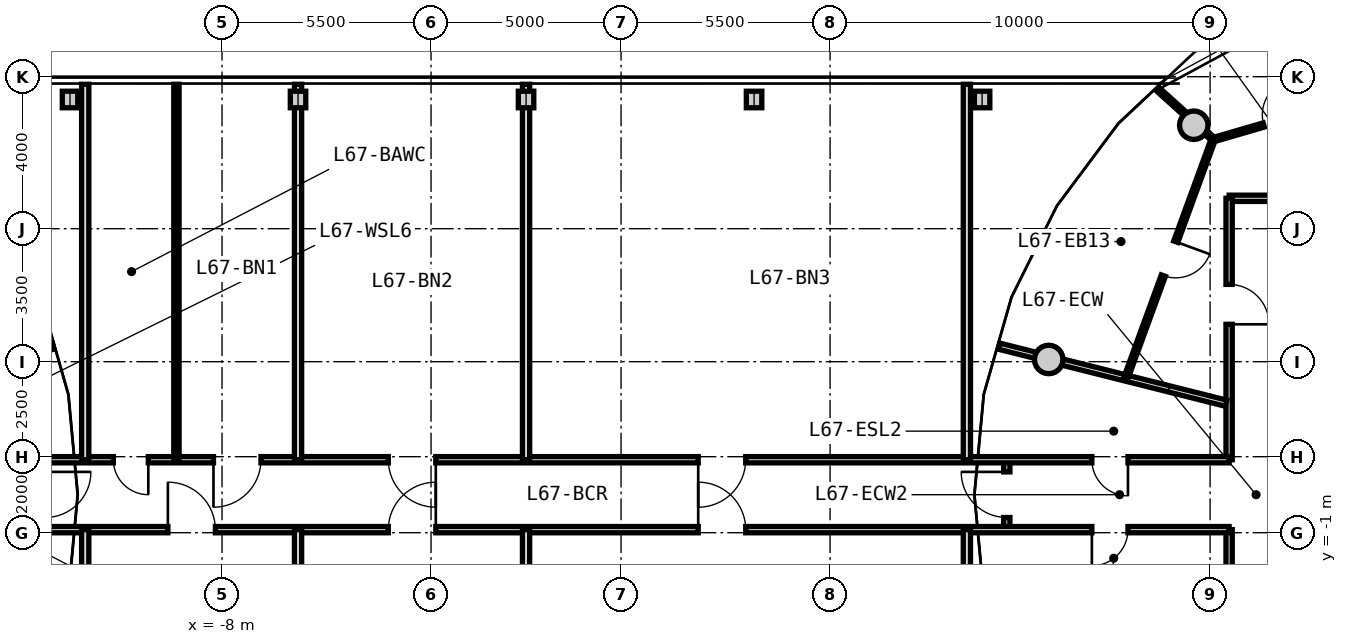
"""IFC4 building model, lengths in metres.
Left out: names, types, materials, properties, quantities, classifications, styles, units other than length and angle.
Written with IfcOpenShell. Run it as: python <this file> out.ifc"""

import sys

from ifc_helpers import new_model, si_unit, direction, frame, frame_2d, origin, origin_2d, place, context, subcontext, project, spatial, rectangle, circle, i_section, extrude, source, transform, mapped, element, fill, save


model = new_model("IFC4")
c1 = context("Model", 3, precision=1e-05, world=origin(), true_north=direction((0.0, 1.0)))
c2 = subcontext(c1, "Body", "Model", "MODEL_VIEW")
j1 = project(units=[si_unit("LENGTHUNIT", "METRE"), si_unit("PLANEANGLEUNIT", "RADIAN")], contexts=[c1])
p1 = place(None, origin())
s1 = spatial("IfcSite", under=j1, at=p1, CompositionType="ELEMENT")
p2 = place(p1, origin())
s2 = spatial("IfcBuilding", under=s1, at=p2, CompositionType="ELEMENT")
p3 = place(p2, frame((0.0, 0.0, 216.95)))
s3 = spatial("IfcBuildingStorey", under=s2, at=p3, CompositionType="ELEMENT", Elevation=216.95)
m1 = source(origin(), c2, "Body", "SweptSolid", [
    extrude(circle(Radius=0.375, at=origin_2d()), origin(), (0.0, 0.0, 1.0), 3.05),
])
for number, where, z_axis, x_axis in (
    (1, (17.57, 9.723, 0.0), (0.0, 0.0, 1.0), (1.0, 0.0, 0.0)),
    (2, (13.753, 3.559, 0.0), (0.0, 0.0, 1.0), (1.0, 0.0, 0.0)),
):
    element("IfcColumn", number, at=place(p3, frame(where, z_axis=z_axis, x_axis=x_axis)), inside=s3, PredefinedType="COLUMN", context=c2, shape_type="MappedRepresentation", body=[
        mapped(m1, transform((0.0, 0.0, 0.0), x_axis=(1.0, 0.0, 0.0), y_axis=(0.0, 1.0, 0.0), z_axis=(0.0, 0.0, 1.0), scale=1.0)),
    ])
m2 = source(origin(), c2, "Body", "SweptSolid", [
    extrude(i_section(OverallWidth=0.407, OverallDepth=0.435, WebThickness=0.024, FlangeThickness=0.039, FilletRadius=0.015, at=origin_2d()), origin(), (0.0, 0.0, 1.0), 3.05),
])
for number, where, z_axis, x_axis in (
    (3, (-12.0, 10.4, 0.0), (0.0, 0.0, 1.0), (1.0, 0.0, 0.0)),
    (4, (-6.0, 10.4, 0.0), (0.0, 0.0, 1.0), (1.0, 0.0, 0.0)),
    (5, (0.0, 10.4, 0.0), (0.0, 0.0, 1.0), (1.0, 0.0, 0.0)),
    (6, (6.0, 10.4, 0.0), (0.0, 0.0, 1.0), (1.0, 0.0, 0.0)),
    (7, (12.0, 10.4, 0.0), (0.0, 0.0, 1.0), (1.0, 0.0, 0.0)),
):
    element("IfcColumn", number, at=place(p3, frame(where, z_axis=z_axis, x_axis=x_axis)), inside=s3, PredefinedType="COLUMN", context=c2, shape_type="MappedRepresentation", body=[
        mapped(m2, transform((0.0, 0.0, 0.0), x_axis=(1.0, 0.0, 0.0), y_axis=(0.0, 1.0, 0.0), z_axis=(0.0, 0.0, 1.0), scale=1.0)),
    ])
m3 = source(origin(), c2, "Body", "SweptSolid", [
    extrude(rectangle(XDim=6.157, YDim=0.165, at=frame_2d((3.079, 0.0))), origin(), (0.0, 0.0, 1.0), 2.345),
])
p4 = place(p3, frame((-18.42, 2.407, 0.0), z_axis=(0.0, 0.0, 1.0), x_axis=(0.969840867184, 0.243738984038, 0.0)))
e8 = element("IfcWall", 8, at=p4, inside=s3, PredefinedType="PARTITIONING", context=c2, shape_type="MappedRepresentation", body=[
    mapped(m3, transform((0.0, 0.0, 0.0), x_axis=(1.0, 0.0, 0.0), y_axis=(0.0, 1.0, 0.0), z_axis=(0.0, 0.0, 1.0), scale=1.0)),
])
m4 = source(origin(), c2, "Body", "SweptSolid", [
    extrude(rectangle(XDim=8.58, YDim=0.165, at=frame_2d((4.29, 0.0))), origin(), (0.0, 0.0, 1.0), 2.745),
])
p5 = place(p3, frame((18.5, 7.8, 0.0), z_axis=(0.0, 0.0, 1.0), x_axis=(1.0, 0.0, 0.0)))
e9 = element("IfcWall", 9, at=p5, inside=s3, PredefinedType="PARTITIONING", context=c2, shape_type="MappedRepresentation", body=[
    mapped(m4, transform((0.0, 0.0, 0.0), x_axis=(1.0, 0.0, 0.0), y_axis=(0.0, 1.0, 0.0), z_axis=(0.0, 0.0, 1.0), scale=1.0)),
])
m5 = source(origin(), c2, "Body", "SweptSolid", [
    extrude(rectangle(XDim=6.88, YDim=0.165, at=frame_2d((3.44, 0.0))), origin(), (0.0, 0.0, 1.0), 2.745),
])
p6 = place(p3, frame((18.5, -7.8, 0.0), z_axis=(0.0, 0.0, 1.0), x_axis=(0.0, 1.0, 0.0)))
e10 = element("IfcWall", 10, at=p6, inside=s3, PredefinedType="PARTITIONING", context=c2, shape_type="MappedRepresentation", body=[
    mapped(m5, transform((0.0, 0.0, 0.0), x_axis=(1.0, 0.0, 0.0), y_axis=(0.0, 1.0, 0.0), z_axis=(0.0, 0.0, 1.0), scale=1.0)),
])
p7 = place(p3, frame((18.5, 0.92, 0.0), z_axis=(0.0, 0.0, 1.0), x_axis=(0.0, 1.0, 0.0)))
e11 = element("IfcWall", 11, at=p7, inside=s3, PredefinedType="PARTITIONING", context=c2, shape_type="MappedRepresentation", body=[
    mapped(m5, transform((0.0, 0.0, 0.0), x_axis=(1.0, 0.0, 0.0), y_axis=(0.0, 1.0, 0.0), z_axis=(0.0, 0.0, 1.0), scale=1.0)),
])
p8 = place(p7, frame((3.564, 0.0, 0.0)))
e12 = element("IfcOpeningElement", 12, at=p8, cuts=e11, PredefinedType="OPENING", context=c2, shape_type="SweptSolid", body=[
    extrude(rectangle(XDim=1.05, YDim=2.15, at=frame_2d((0.525, 1.075))), frame((0.0, 0.093, 0.0), z_axis=(0.0, -1.0, 0.0), x_axis=(1.0, 0.0, 0.0)), (0.0, 0.0, 1.0), 0.185),
])
p9 = place(p3, frame((18.42, 2.407, 0.0), z_axis=(0.0, 0.0, 1.0), x_axis=(-0.969840867184, 0.243738984038, 0.0)))
e13 = element("IfcWall", 13, at=p9, inside=s3, PredefinedType="PARTITIONING", context=c2, shape_type="MappedRepresentation", body=[
    mapped(m3, transform((0.0, 0.0, 0.0), x_axis=(1.0, 0.0, 0.0), y_axis=(0.0, 1.0, 0.0), z_axis=(0.0, 0.0, 1.0), scale=1.0)),
])
m6 = source(origin(), c2, "Body", "SweptSolid", [
    extrude(rectangle(XDim=6.69, YDim=0.115, at=frame_2d((3.345, 0.0))), origin(), (0.0, 0.0, 1.0), 2.745),
])
p10 = place(p3, frame((18.083, 9.352, 0.0), z_axis=(0.0, 0.0, 1.0), x_axis=(-0.343693784919, -0.939081776102, 0.0)))
e14 = element("IfcWall", 14, at=p10, inside=s3, PredefinedType="PARTITIONING", context=c2, shape_type="MappedRepresentation", body=[
    mapped(m6, transform((0.0, 0.0, 0.0), x_axis=(1.0, 0.0, 0.0), y_axis=(0.0, 1.0, 0.0), z_axis=(0.0, 0.0, 1.0), scale=1.0)),
])
p11 = place(p10, frame((2.87, 0.0, 0.0)))
e15 = element("IfcOpeningElement", 15, at=p11, cuts=e14, PredefinedType="OPENING", context=c2, shape_type="SweptSolid", body=[
    extrude(rectangle(XDim=0.95, YDim=2.1, at=frame_2d((0.475, 1.05))), frame((0.0, 0.067, 0.0), z_axis=(0.0, -1.0, 0.0), x_axis=(1.0, 0.0, 0.0)), (0.0, 0.0, 1.0), 0.135),
])
m7 = source(origin(), c2, "Body", "SweptSolid", [
    extrude(rectangle(XDim=1.977, YDim=0.115, at=frame_2d((0.989, 0.0))), origin(), (0.0, 0.0, 1.0), 2.345),
])
p12 = place(p3, frame((18.083, 9.352, 0.0), z_axis=(0.0, 0.0, 1.0), x_axis=(-0.742064998629, 0.670327933037, 0.0)))
e16 = element("IfcWall", 16, at=p12, inside=s3, PredefinedType="PARTITIONING", context=c2, shape_type="MappedRepresentation", body=[
    mapped(m7, transform((0.0, 0.0, 0.0), x_axis=(1.0, 0.0, 0.0), y_axis=(0.0, 1.0, 0.0), z_axis=(0.0, 0.0, 1.0), scale=1.0)),
])
m8 = source(origin(), c2, "Body", "SweptSolid", [
    extrude(rectangle(XDim=3.702, YDim=0.115, at=frame_2d((1.851, 0.0))), origin(), (0.0, 0.0, 1.0), 2.745),
])
p13 = place(p3, frame((21.645, 10.38, 0.0), z_axis=(0.0, 0.0, 1.0), x_axis=(-0.960044309887, -0.279848035645, 0.0)))
e17 = element("IfcWall", 17, at=p13, inside=s3, PredefinedType="PARTITIONING", context=c2, shape_type="MappedRepresentation", body=[
    mapped(m8, transform((0.0, 0.0, 0.0), x_axis=(1.0, 0.0, 0.0), y_axis=(0.0, 1.0, 0.0), z_axis=(0.0, 0.0, 1.0), scale=1.0)),
])
p14 = place(p13, frame((1.376, 0.0, 0.0)))
e18 = element("IfcOpeningElement", 18, at=p14, cuts=e17, PredefinedType="OPENING", context=c2, shape_type="SweptSolid", body=[
    extrude(rectangle(XDim=0.95, YDim=2.1, at=frame_2d((0.475, 1.05))), frame((0.0, 0.067, 0.0), z_axis=(0.0, -1.0, 0.0), x_axis=(1.0, 0.0, 0.0)), (0.0, 0.0, 1.0), 0.135),
])
m9 = source(origin(), c2, "Body", "SweptSolid", [
    extrude(rectangle(XDim=1.84, YDim=0.165, at=frame_2d((0.92, 0.0))), origin(), (0.0, 0.0, 1.0), 2.745),
])
p15 = place(p3, frame((12.65, -0.92, 0.0), z_axis=(0.0, 0.0, 1.0), x_axis=(0.0, 1.0, 0.0)))
e19 = element("IfcWall", 19, at=p15, inside=s3, PredefinedType="PARTITIONING", context=c2, shape_type="MappedRepresentation", body=[
    mapped(m9, transform((0.0, 0.0, 0.0), x_axis=(1.0, 0.0, 0.0), y_axis=(0.0, 1.0, 0.0), z_axis=(0.0, 0.0, 1.0), scale=1.0)),
])
p16 = place(p15, frame((0.32, 0.0, 0.0)))
e20 = element("IfcOpeningElement", 20, at=p16, cuts=e19, PredefinedType="OPENING", context=c2, shape_type="SweptSolid", body=[
    extrude(rectangle(XDim=1.2, YDim=2.15, at=frame_2d((0.6, 1.075))), frame((0.0, 0.093, 0.0), z_axis=(0.0, -1.0, 0.0), x_axis=(1.0, 0.0, 0.0)), (0.0, 0.0, 1.0), 0.185),
])
m10 = source(origin(), c2, "Body", "SweptSolid", [
    extrude(rectangle(XDim=37.0, YDim=0.165, at=frame_2d((18.5, 0.0))), origin(), (0.0, 0.0, 1.0), 2.745),
])
p17 = place(p3, frame((-18.5, -0.92, 0.0), z_axis=(0.0, 0.0, 1.0), x_axis=(1.0, 0.0, 0.0)))
e21 = element("IfcWall", 21, at=p17, inside=s3, PredefinedType="PARTITIONING", context=c2, shape_type="MappedRepresentation", body=[
    mapped(m10, transform((0.0, 0.0, 0.0), x_axis=(1.0, 0.0, 0.0), y_axis=(0.0, 1.0, 0.0), z_axis=(0.0, 0.0, 1.0), scale=1.0)),
])
p18 = place(p17, frame((2.662, 0.0, 0.0)))
e22 = element("IfcOpeningElement", 22, at=p18, cuts=e21, PredefinedType="OPENING", context=c2, shape_type="SweptSolid", body=[
    extrude(rectangle(XDim=0.95, YDim=2.1, at=frame_2d((0.475, 1.05))), frame((0.0, 0.093, 0.0), z_axis=(0.0, -1.0, 0.0), x_axis=(1.0, 0.0, 0.0)), (0.0, 0.0, 1.0), 0.185),
])
p19 = place(p17, frame((33.388, 0.0, 0.0)))
e23 = element("IfcOpeningElement", 23, at=p19, cuts=e21, PredefinedType="OPENING", context=c2, shape_type="SweptSolid", body=[
    extrude(rectangle(XDim=0.95, YDim=2.1, at=frame_2d((0.475, 1.05))), frame((0.0, 0.093, 0.0), z_axis=(0.0, -1.0, 0.0), x_axis=(1.0, 0.0, 0.0)), (0.0, 0.0, 1.0), 0.185),
])
p20 = place(p17, frame((9.075, 0.0, 0.0)))
e24 = element("IfcOpeningElement", 24, at=p20, cuts=e21, PredefinedType="OPENING", context=c2, shape_type="SweptSolid", body=[
    extrude(rectangle(XDim=1.25, YDim=2.2, at=frame_2d((0.625, 1.1))), frame((0.0, 0.093, 0.0), z_axis=(0.0, -1.0, 0.0), x_axis=(1.0, 0.0, 0.0)), (0.0, 0.0, 1.0), 0.185),
])
p21 = place(p17, frame((14.875, 0.0, 0.0)))
e25 = element("IfcOpeningElement", 25, at=p21, cuts=e21, PredefinedType="OPENING", context=c2, shape_type="SweptSolid", body=[
    extrude(rectangle(XDim=1.25, YDim=2.2, at=frame_2d((0.625, 1.1))), frame((0.0, 0.093, 0.0), z_axis=(0.0, -1.0, 0.0), x_axis=(1.0, 0.0, 0.0)), (0.0, 0.0, 1.0), 0.185),
])
p22 = place(p17, frame((23.03, 0.0, 0.0)))
e26 = element("IfcOpeningElement", 26, at=p22, cuts=e21, PredefinedType="OPENING", context=c2, shape_type="SweptSolid", body=[
    extrude(rectangle(XDim=1.25, YDim=2.2, at=frame_2d((0.625, 1.1))), frame((0.0, 0.093, 0.0), z_axis=(0.0, -1.0, 0.0), x_axis=(1.0, 0.0, 0.0)), (0.0, 0.0, 1.0), 0.185),
])
p23 = place(p3, frame((-18.5, 0.92, 0.0), z_axis=(0.0, 0.0, 1.0), x_axis=(1.0, 0.0, 0.0)))
e27 = element("IfcWall", 27, at=p23, inside=s3, PredefinedType="PARTITIONING", context=c2, shape_type="MappedRepresentation", body=[
    mapped(m10, transform((0.0, 0.0, 0.0), x_axis=(1.0, 0.0, 0.0), y_axis=(0.0, 1.0, 0.0), z_axis=(0.0, 0.0, 1.0), scale=1.0)),
])
p24 = place(p23, frame((2.662, 0.0, 0.0)))
e28 = element("IfcOpeningElement", 28, at=p24, cuts=e27, PredefinedType="OPENING", context=c2, shape_type="SweptSolid", body=[
    extrude(rectangle(XDim=0.95, YDim=2.1, at=frame_2d((0.475, 1.05))), frame((0.0, 0.093, 0.0), z_axis=(0.0, -1.0, 0.0), x_axis=(1.0, 0.0, 0.0)), (0.0, 0.0, 1.0), 0.185),
])
p25 = place(p23, frame((33.388, 0.0, 0.0)))
e29 = element("IfcOpeningElement", 29, at=p25, cuts=e27, PredefinedType="OPENING", context=c2, shape_type="SweptSolid", body=[
    extrude(rectangle(XDim=0.95, YDim=2.1, at=frame_2d((0.475, 1.05))), frame((0.0, 0.093, 0.0), z_axis=(0.0, -1.0, 0.0), x_axis=(1.0, 0.0, 0.0)), (0.0, 0.0, 1.0), 0.185),
])
p26 = place(p23, frame((7.64, 0.0, 0.0)))
e30 = element("IfcOpeningElement", 30, at=p26, cuts=e27, PredefinedType="OPENING", context=c2, shape_type="SweptSolid", body=[
    extrude(rectangle(XDim=0.92, YDim=2.1, at=frame_2d((0.46, 1.05))), frame((0.0, 0.093, 0.0), z_axis=(0.0, -1.0, 0.0), x_axis=(1.0, 0.0, 0.0)), (0.0, 0.0, 1.0), 0.185),
])
p27 = place(p23, frame((10.275, 0.0, 0.0)))
e31 = element("IfcOpeningElement", 31, at=p27, cuts=e27, PredefinedType="OPENING", context=c2, shape_type="SweptSolid", body=[
    extrude(rectangle(XDim=1.25, YDim=2.2, at=frame_2d((0.625, 1.1))), frame((0.0, 0.093, 0.0), z_axis=(0.0, -1.0, 0.0), x_axis=(1.0, 0.0, 0.0)), (0.0, 0.0, 1.0), 0.185),
])
p28 = place(p23, frame((14.875, 0.0, 0.0)))
e32 = element("IfcOpeningElement", 32, at=p28, cuts=e27, PredefinedType="OPENING", context=c2, shape_type="SweptSolid", body=[
    extrude(rectangle(XDim=1.25, YDim=2.2, at=frame_2d((0.625, 1.1))), frame((0.0, 0.093, 0.0), z_axis=(0.0, -1.0, 0.0), x_axis=(1.0, 0.0, 0.0)), (0.0, 0.0, 1.0), 0.185),
])
p29 = place(p23, frame((23.03, 0.0, 0.0)))
e33 = element("IfcOpeningElement", 33, at=p29, cuts=e27, PredefinedType="OPENING", context=c2, shape_type="SweptSolid", body=[
    extrude(rectangle(XDim=1.25, YDim=2.2, at=frame_2d((0.625, 1.1))), frame((0.0, 0.093, 0.0), z_axis=(0.0, -1.0, 0.0), x_axis=(1.0, 0.0, 0.0)), (0.0, 0.0, 1.0), 0.185),
])
m11 = source(origin(), c2, "Body", "SweptSolid", [
    extrude(rectangle(XDim=9.88, YDim=0.19, at=frame_2d((4.94, 0.0))), origin(), (0.0, 0.0, 1.0), 2.745),
])
for number, where, z_axis, x_axis in (
    (34, (-11.6, -10.8, 0.0), (0.0, 0.0, 1.0), (0.0, 1.0, 0.0)),
    (35, (-11.6, 0.92, 0.0), (0.0, 0.0, 1.0), (0.0, 1.0, 0.0)),
    (36, (11.6, -10.8, 0.0), (0.0, 0.0, 1.0), (0.0, 1.0, 0.0)),
    (37, (11.6, 0.92, 0.0), (0.0, 0.0, 1.0), (0.0, 1.0, 0.0)),
):
    element("IfcWall", number, at=place(p3, frame(where, z_axis=z_axis, x_axis=x_axis)), inside=s3, PredefinedType="PARTITIONING", context=c2, shape_type="MappedRepresentation", body=[
        mapped(m11, transform((0.0, 0.0, 0.0), x_axis=(1.0, 0.0, 0.0), y_axis=(0.0, 1.0, 0.0), z_axis=(0.0, 0.0, 1.0), scale=1.0)),
    ])
m12 = source(origin(), c2, "Body", "SweptSolid", [
    extrude(rectangle(XDim=9.88, YDim=0.19, at=frame_2d((4.94, 0.0))), origin(), (0.0, 0.0, 1.0), 2.045),
])
for number, where, z_axis, x_axis in (
    (38, (-6.0, -10.8, 0.0), (0.0, 0.0, 1.0), (0.0, 1.0, 0.0)),
    (39, (-6.0, 0.92, 0.0), (0.0, 0.0, 1.0), (0.0, 1.0, 0.0)),
):
    element("IfcWall", number, at=place(p3, frame(where, z_axis=z_axis, x_axis=x_axis)), inside=s3, PredefinedType="PARTITIONING", context=c2, shape_type="MappedRepresentation", body=[
        mapped(m12, transform((0.0, 0.0, 0.0), x_axis=(1.0, 0.0, 0.0), y_axis=(0.0, 1.0, 0.0), z_axis=(0.0, 0.0, 1.0), scale=1.0)),
    ])
m13 = source(origin(), c2, "Body", "SweptSolid", [
    extrude(rectangle(XDim=9.88, YDim=0.14, at=frame_2d((4.94, 0.0))), origin(), (0.0, 0.0, 1.0), 2.745),
])
p30 = place(p3, frame((-9.2, 0.92, 0.0), z_axis=(0.0, 0.0, 1.0), x_axis=(0.0, 1.0, 0.0)))
e40 = element("IfcWall", 40, at=p30, inside=s3, PredefinedType="PARTITIONING", context=c2, shape_type="MappedRepresentation", body=[
    mapped(m13, transform((0.0, 0.0, 0.0), x_axis=(1.0, 0.0, 0.0), y_axis=(0.0, 1.0, 0.0), z_axis=(0.0, 0.0, 1.0), scale=1.0)),
])
for number, where, z_axis, x_axis in (
    (41, (0.0, -10.8, 0.0), (0.0, 0.0, 1.0), (0.0, 1.0, 0.0)),
    (42, (0.0, 0.92, 0.0), (0.0, 0.0, 1.0), (0.0, 1.0, 0.0)),
):
    element("IfcWall", number, at=place(p3, frame(where, z_axis=z_axis, x_axis=x_axis)), inside=s3, PredefinedType="PARTITIONING", context=c2, shape_type="MappedRepresentation", body=[
        mapped(m12, transform((0.0, 0.0, 0.0), x_axis=(1.0, 0.0, 0.0), y_axis=(0.0, 1.0, 0.0), z_axis=(0.0, 0.0, 1.0), scale=1.0)),
    ])
m14 = source(origin(), c2, "Body", "SweptSolid", [
    extrude(rectangle(XDim=0.95, YDim=2.1, at=frame_2d((0.475, 1.05))), frame((0.0, 0.025, 0.0), z_axis=(0.0, -1.0, 0.0), x_axis=(1.0, 0.0, 0.0)), (0.0, 0.0, 1.0), 0.05),
])
p31 = place(p19, frame((0.95, 0.0, 0.0), z_axis=(0.0, 0.0, 1.0), x_axis=(-1.0, 0.0, 0.0)))
e43 = element("IfcDoor", 43, at=p31, inside=s3, OperationType="SINGLE_SWING_RIGHT", PredefinedType="DOOR", context=c2, shape_type="MappedRepresentation", body=[
    mapped(m14, transform((0.0, 0.0, 0.0), x_axis=(1.0, 0.0, 0.0), y_axis=(0.0, 1.0, 0.0), z_axis=(0.0, 0.0, 1.0), scale=1.0)),
])
fill(e23, e43)
p32 = place(p25, frame((0.95, 0.0, 0.0), z_axis=(0.0, 0.0, 1.0), x_axis=(-1.0, 0.0, 0.0)))
e44 = element("IfcDoor", 44, at=p32, inside=s3, OperationType="SINGLE_SWING_LEFT", PredefinedType="DOOR", context=c2, shape_type="MappedRepresentation", body=[
    mapped(m14, transform((0.0, 0.0, 0.0), x_axis=(1.0, 0.0, 0.0), y_axis=(0.0, 1.0, 0.0), z_axis=(0.0, 0.0, 1.0), scale=1.0)),
])
fill(e29, e44)
m15 = source(origin(), c2, "Body", "SweptSolid", [
    extrude(rectangle(XDim=1.05, YDim=2.15, at=frame_2d((0.525, 1.075))), frame((0.0, 0.025, 0.0), z_axis=(0.0, -1.0, 0.0), x_axis=(1.0, 0.0, 0.0)), (0.0, 0.0, 1.0), 0.05),
])
p33 = place(p8, frame((1.05, 0.0, 0.0), z_axis=(0.0, 0.0, 1.0), x_axis=(-1.0, 0.0, 0.0)))
e45 = element("IfcDoor", 45, at=p33, inside=s3, OperationType="SINGLE_SWING_RIGHT", PredefinedType="DOOR", context=c2, shape_type="MappedRepresentation", body=[
    mapped(m15, transform((0.0, 0.0, 0.0), x_axis=(1.0, 0.0, 0.0), y_axis=(0.0, 1.0, 0.0), z_axis=(0.0, 0.0, 1.0), scale=1.0)),
])
fill(e12, e45)
p34 = place(p14, frame((0.95, 0.0, 0.0), z_axis=(0.0, 0.0, 1.0), x_axis=(-1.0, 0.0, 0.0)))
e46 = element("IfcDoor", 46, at=p34, inside=s3, OperationType="SINGLE_SWING_RIGHT", PredefinedType="DOOR", context=c2, shape_type="MappedRepresentation", body=[
    mapped(m14, transform((0.0, 0.0, 0.0), x_axis=(1.0, 0.0, 0.0), y_axis=(0.0, 1.0, 0.0), z_axis=(0.0, 0.0, 1.0), scale=1.0)),
])
fill(e18, e46)
p35 = place(p11, origin())
e47 = element("IfcDoor", 47, at=p35, inside=s3, OperationType="SINGLE_SWING_LEFT", PredefinedType="DOOR", context=c2, shape_type="MappedRepresentation", body=[
    mapped(m14, transform((0.0, 0.0, 0.0), x_axis=(1.0, 0.0, 0.0), y_axis=(0.0, 1.0, 0.0), z_axis=(0.0, 0.0, 1.0), scale=1.0)),
])
fill(e15, e47)
m16 = source(origin(), c2, "Body", "SweptSolid", [
    extrude(rectangle(XDim=1.2, YDim=2.15, at=frame_2d((0.6, 1.075))), frame((0.0, 0.025, 0.0), z_axis=(0.0, -1.0, 0.0), x_axis=(1.0, 0.0, 0.0)), (0.0, 0.0, 1.0), 0.05),
])
p36 = place(p16, origin())
e48 = element("IfcDoor", 48, at=p36, inside=s3, OperationType="SINGLE_SWING_RIGHT", PredefinedType="DOOR", context=c2, shape_type="MappedRepresentation", body=[
    mapped(m16, transform((0.0, 0.0, 0.0), x_axis=(1.0, 0.0, 0.0), y_axis=(0.0, 1.0, 0.0), z_axis=(0.0, 0.0, 1.0), scale=1.0)),
])
fill(e20, e48)
m17 = source(origin(), c2, "Body", "SweptSolid", [
    extrude(rectangle(XDim=1.25, YDim=2.2, at=frame_2d((0.625, 1.1))), frame((0.0, 0.025, 0.0), z_axis=(0.0, -1.0, 0.0), x_axis=(1.0, 0.0, 0.0)), (0.0, 0.0, 1.0), 0.05),
])
p37 = place(p20, origin())
e49 = element("IfcDoor", 49, at=p37, inside=s3, OperationType="SINGLE_SWING_LEFT", PredefinedType="DOOR", context=c2, shape_type="MappedRepresentation", body=[
    mapped(m17, transform((0.0, 0.0, 0.0), x_axis=(1.0, 0.0, 0.0), y_axis=(0.0, 1.0, 0.0), z_axis=(0.0, 0.0, 1.0), scale=1.0)),
])
fill(e24, e49)
m18 = source(origin(), c2, "Body", "SweptSolid", [
    extrude(rectangle(XDim=0.92, YDim=2.1, at=frame_2d((0.46, 1.05))), frame((0.0, 0.025, 0.0), z_axis=(0.0, -1.0, 0.0), x_axis=(1.0, 0.0, 0.0)), (0.0, 0.0, 1.0), 0.05),
])
p38 = place(p26, frame((0.92, 0.0, 0.0), z_axis=(0.0, 0.0, 1.0), x_axis=(-1.0, 0.0, 0.0)))
e50 = element("IfcDoor", 50, at=p38, inside=s3, OperationType="SINGLE_SWING_LEFT", PredefinedType="DOOR", context=c2, shape_type="MappedRepresentation", body=[
    mapped(m18, transform((0.0, 0.0, 0.0), x_axis=(1.0, 0.0, 0.0), y_axis=(0.0, 1.0, 0.0), z_axis=(0.0, 0.0, 1.0), scale=1.0)),
])
fill(e30, e50)
p39 = place(p27, frame((1.25, 0.0, 0.0), z_axis=(0.0, 0.0, 1.0), x_axis=(-1.0, 0.0, 0.0)))
e51 = element("IfcDoor", 51, at=p39, inside=s3, OperationType="SINGLE_SWING_RIGHT", PredefinedType="DOOR", context=c2, shape_type="MappedRepresentation", body=[
    mapped(m17, transform((0.0, 0.0, 0.0), x_axis=(1.0, 0.0, 0.0), y_axis=(0.0, 1.0, 0.0), z_axis=(0.0, 0.0, 1.0), scale=1.0)),
])
fill(e31, e51)
p40 = place(p21, origin())
e52 = element("IfcDoor", 52, at=p40, inside=s3, OperationType="SINGLE_SWING_RIGHT", PredefinedType="DOOR", context=c2, shape_type="MappedRepresentation", body=[
    mapped(m17, transform((0.0, 0.0, 0.0), x_axis=(1.0, 0.0, 0.0), y_axis=(0.0, 1.0, 0.0), z_axis=(0.0, 0.0, 1.0), scale=1.0)),
])
fill(e25, e52)
p41 = place(p28, frame((1.25, 0.0, 0.0), z_axis=(0.0, 0.0, 1.0), x_axis=(-1.0, 0.0, 0.0)))
e53 = element("IfcDoor", 53, at=p41, inside=s3, OperationType="SINGLE_SWING_LEFT", PredefinedType="DOOR", context=c2, shape_type="MappedRepresentation", body=[
    mapped(m17, transform((0.0, 0.0, 0.0), x_axis=(1.0, 0.0, 0.0), y_axis=(0.0, 1.0, 0.0), z_axis=(0.0, 0.0, 1.0), scale=1.0)),
])
fill(e32, e53)
p42 = place(p22, origin())
e54 = element("IfcDoor", 54, at=p42, inside=s3, OperationType="SINGLE_SWING_LEFT", PredefinedType="DOOR", context=c2, shape_type="MappedRepresentation", body=[
    mapped(m17, transform((0.0, 0.0, 0.0), x_axis=(1.0, 0.0, 0.0), y_axis=(0.0, 1.0, 0.0), z_axis=(0.0, 0.0, 1.0), scale=1.0)),
])
fill(e26, e54)
p43 = place(p29, frame((1.25, 0.0, 0.0), z_axis=(0.0, 0.0, 1.0), x_axis=(-1.0, 0.0, 0.0)))
e55 = element("IfcDoor", 55, at=p43, inside=s3, OperationType="SINGLE_SWING_RIGHT", PredefinedType="DOOR", context=c2, shape_type="MappedRepresentation", body=[
    mapped(m17, transform((0.0, 0.0, 0.0), x_axis=(1.0, 0.0, 0.0), y_axis=(0.0, 1.0, 0.0), z_axis=(0.0, 0.0, 1.0), scale=1.0)),
])
fill(e33, e55)
save(model, sys.argv[1])
